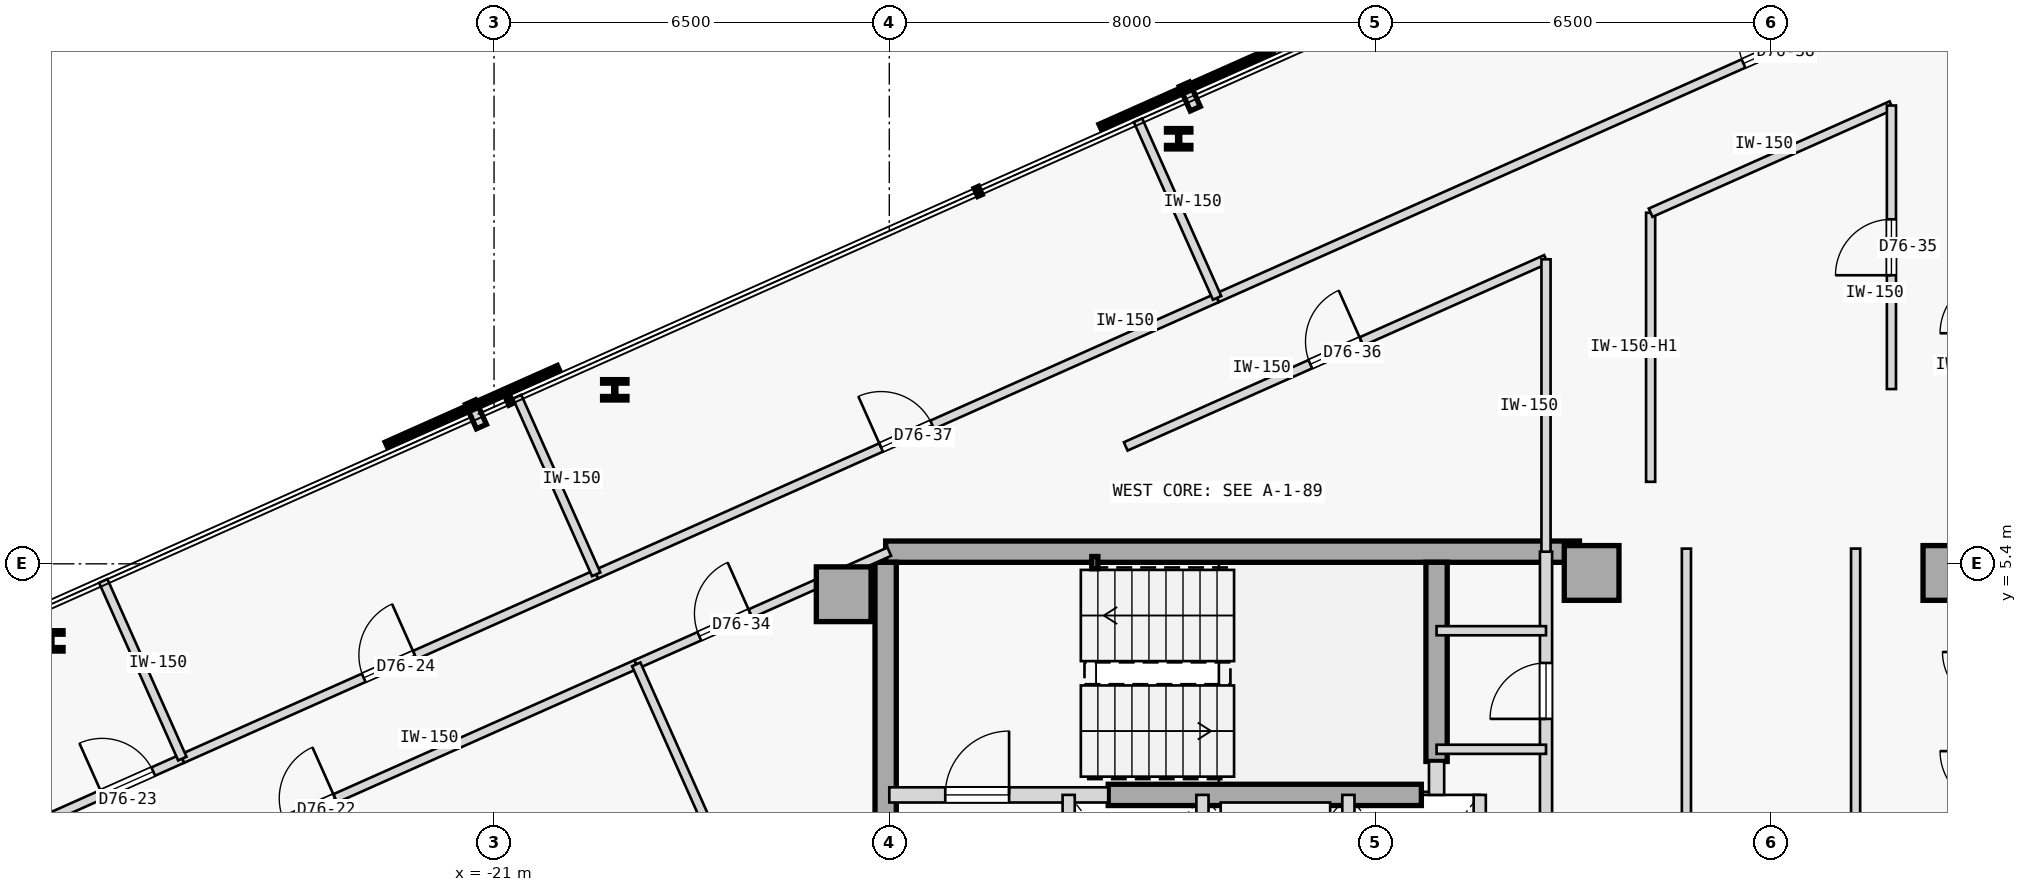
"""IFC4 building model, lengths in metres.
Left out: names, types, materials, properties, quantities, classifications, styles, units other than length and angle.
Written with IfcOpenShell. Run it as: python <this file> out.ifc"""

import sys

from ifc_helpers import new_model, si_unit, direction, frame, frame_2d, origin, origin_2d, place, context, subcontext, project, spatial, rectangle, hollow_rectangle, i_section, extrude, element, fill, save


model = new_model("IFC4")
c1 = context("Model", 3, precision=1e-05, world=origin(), true_north=direction((0.0, 1.0)))
c2 = subcontext(c1, "Body", "Model", "MODEL_VIEW")
j1 = project(units=[si_unit("LENGTHUNIT", "METRE"), si_unit("PLANEANGLEUNIT", "RADIAN")], contexts=[c1])
p1 = place(None, origin())
s1 = spatial("IfcSite", under=j1, at=p1, CompositionType="ELEMENT")
p2 = place(p1, origin())
s2 = spatial("IfcBuilding", under=s1, at=p2, CompositionType="ELEMENT")
p3 = place(p2, frame((0.0, 0.0, 285.25)))
s3 = spatial("IfcBuildingStorey", under=s2, at=p3, CompositionType="ELEMENT", Elevation=285.25)
for number, where, z_axis, x_axis in (
    (1, (-15.25, 4.9, 0.0), (0.0, 0.0, 1.0), (1.0, 0.0, 0.0)),
    (2, (-2.95, 5.25, 0.0), (0.0, 0.0, 1.0), (1.0, 0.0, 0.0)),
    (3, (2.95, 5.25, 0.0), (0.0, 0.0, 1.0), (1.0, 0.0, 0.0)),
):
    element("IfcColumn", number, at=place(p3, frame(where, z_axis=z_axis, x_axis=x_axis)), inside=s3, PredefinedType="COLUMN", context=c2, shape_type="SweptSolid", body=[
        extrude(rectangle(XDim=0.9, YDim=0.9, at=origin_2d()), origin(), (0.0, 0.0, 1.0), 3.35),
    ])
p4 = place(p3, frame((-14.56, 5.6, 0.0), z_axis=(0.0, 0.0, 1.0), x_axis=(1.0, 0.0, 0.0)))
e4 = element("IfcWall", 4, at=p4, inside=s3, PredefinedType="SHEAR", context=c2, shape_type="SweptSolid", body=[
    extrude(rectangle(XDim=11.41, YDim=0.35, at=frame_2d((5.705, 0.0))), origin(), (0.0, 0.0, 1.0), 3.125),
])
p5 = place(p3, frame((-14.56, -5.425, 0.0), z_axis=(0.0, 0.0, 1.0), x_axis=(0.0, 1.0, 0.0)))
e5 = element("IfcWall", 5, at=p5, inside=s3, PredefinedType="SHEAR", context=c2, shape_type="SweptSolid", body=[
    extrude(rectangle(XDim=10.85, YDim=0.35, at=frame_2d((5.425, 0.0))), origin(), (0.0, 0.0, 1.0), 3.125),
])
p6 = place(p3, frame((-5.5, 2.15, 0.0), z_axis=(0.0, 0.0, 1.0), x_axis=(0.0, 1.0, 0.0)))
e6 = element("IfcWall", 6, at=p6, inside=s3, PredefinedType="SHEAR", context=c2, shape_type="SweptSolid", body=[
    extrude(rectangle(XDim=3.275, YDim=0.35, at=frame_2d((1.638, 0.0))), origin(), (0.0, 0.0, 1.0), 3.125),
])
p7 = place(p3, frame((-10.9, 1.6, 0.0), z_axis=(0.0, 0.0, 1.0), x_axis=(1.0, 0.0, 0.0)))
e7 = element("IfcWall", 7, at=p7, inside=s3, PredefinedType="SHEAR", context=c2, shape_type="SweptSolid", body=[
    extrude(rectangle(XDim=5.15, YDim=0.35, at=frame_2d((2.575, 0.0))), origin(), (0.0, 0.0, 1.0), 3.125),
])
p8 = place(p3, frame((-11.12, 5.42, 0.0), z_axis=(0.0, 0.0, 1.0), x_axis=(1.0, 0.0, 0.0)))
e8 = element("IfcColumn", 8, at=p8, inside=s3, PredefinedType="COLUMN", context=c2, shape_type="SweptSolid", body=[
    extrude(hollow_rectangle(XDim=0.1, YDim=0.2, WallThickness=0.008, at=origin_2d()), origin(), (0.0, 0.0, 1.0), 3.35),
])
for number, where, z_axis, x_axis in (
    (9, (-9.741, 12.39, 0.0), (0.0, 0.0, 1.0), (1.0, 0.0, 0.0)),
    (10, (-19.015, 8.262, 0.0), (0.0, 0.0, 1.0), (1.0, 0.0, 0.0)),
    (11, (-28.288, 4.133, 0.0), (0.0, 0.0, 1.0), (1.0, 0.0, 0.0)),
):
    element("IfcColumn", number, at=place(p3, frame(where, z_axis=z_axis, x_axis=x_axis)), inside=s3, PredefinedType="COLUMN", context=c2, shape_type="SweptSolid", body=[
        extrude(i_section(OverallWidth=0.401, OverallDepth=0.335, WebThickness=0.036, FlangeThickness=0.058, FilletRadius=0.015, at=origin_2d()), origin(), (0.0, 0.0, 1.0), 3.35),
    ])
p9 = place(p3, frame((-14.5, 1.6, 0.0), z_axis=(0.0, 0.0, 1.0), x_axis=(1.0, 0.0, 0.0)))
e12 = element("IfcWall", 12, at=p9, inside=s3, PredefinedType="STANDARD", context=c2, shape_type="SweptSolid", body=[
    extrude(rectangle(XDim=3.6, YDim=0.25, at=frame_2d((1.8, 0.0))), origin(), (0.0, 0.0, 1.0), 3.125),
])
p10 = place(p9, frame((0.92, 0.0, 0.0)))
e13 = element("IfcOpeningElement", 13, at=p10, cuts=e12, PredefinedType="OPENING", context=c2, shape_type="SweptSolid", body=[
    extrude(rectangle(XDim=1.05, YDim=2.15, at=frame_2d((0.525, 1.075))), frame((0.0, 0.135, 0.0), z_axis=(0.0, -1.0, 0.0), x_axis=(1.0, 0.0, 0.0)), (0.0, 0.0, 1.0), 0.27),
])
p11 = place(p3, frame((-5.5, 1.6, 0.0), z_axis=(0.0, 0.0, 1.0), x_axis=(0.0, 1.0, 0.0)))
e14 = element("IfcWall", 14, at=p11, inside=s3, PredefinedType="STANDARD", context=c2, shape_type="SweptSolid", body=[
    extrude(rectangle(XDim=0.55, YDim=0.25, at=frame_2d((0.275, 0.0))), origin(), (0.0, 0.0, 1.0), 3.125),
])
p12 = place(p3, frame((-3.7, -1.15, 0.0), z_axis=(0.0, 0.0, 1.0), x_axis=(0.0, 1.0, 0.0)))
e15 = element("IfcWall", 15, at=p12, inside=s3, PredefinedType="STANDARD", context=c2, shape_type="SweptSolid", body=[
    extrude(rectangle(XDim=6.75, YDim=0.2, at=frame_2d((3.375, 0.0))), origin(), (0.0, 0.0, 1.0), 3.125),
])
p13 = place(p12, frame((1.1, 0.0, 0.0)))
e16 = element("IfcOpeningElement", 16, at=p13, cuts=e15, PredefinedType="OPENING", context=c2, shape_type="SweptSolid", body=[
    extrude(rectangle(XDim=0.9, YDim=2.15, at=frame_2d((0.45, 1.075))), frame((0.0, 0.11, 0.0), z_axis=(0.0, -1.0, 0.0), x_axis=(1.0, 0.0, 0.0)), (0.0, 0.0, 1.0), 0.22),
])
p14 = place(p12, frame((4.0, 0.0, 0.0)))
e17 = element("IfcOpeningElement", 17, at=p14, cuts=e15, PredefinedType="OPENING", context=c2, shape_type="SweptSolid", body=[
    extrude(rectangle(XDim=0.92, YDim=2.15, at=frame_2d((0.46, 1.075))), frame((0.0, 0.11, 0.0), z_axis=(0.0, -1.0, 0.0), x_axis=(1.0, 0.0, 0.0)), (0.0, 0.0, 1.0), 0.22),
])
p15 = place(p3, frame((-11.55, -1.15, 0.0), z_axis=(0.0, 0.0, 1.0), x_axis=(0.0, 1.0, 0.0)))
e18 = element("IfcWall", 18, at=p15, inside=s3, PredefinedType="STANDARD", context=c2, shape_type="SweptSolid", body=[
    extrude(rectangle(XDim=2.75, YDim=0.2, at=frame_2d((1.375, 0.0))), origin(), (0.0, 0.0, 1.0), 3.125),
])
p16 = place(p15, frame((0.825, 0.0, 0.0)))
e19 = element("IfcOpeningElement", 19, at=p16, cuts=e18, PredefinedType="OPENING", context=c2, shape_type="SweptSolid", body=[
    extrude(rectangle(XDim=1.1, YDim=2.15, at=frame_2d((0.55, 1.075))), frame((0.0, 0.11, 0.0), z_axis=(0.0, -1.0, 0.0), x_axis=(1.0, 0.0, 0.0)), (0.0, 0.0, 1.0), 0.22),
])
for number, where, z_axis, x_axis in (
    (20, (-9.35, -1.15, 0.0), (0.0, 0.0, 1.0), (0.0, 1.0, 0.0)),
    (21, (-6.95, -1.15, 0.0), (0.0, 0.0, 1.0), (0.0, 1.0, 0.0)),
    (22, (-4.79, -1.15, 0.0), (0.0, 0.0, 1.0), (0.0, 1.0, 0.0)),
):
    element("IfcWall", number, at=place(p3, frame(where, z_axis=z_axis, x_axis=x_axis)), inside=s3, PredefinedType="STANDARD", context=c2, shape_type="SweptSolid", body=[
        extrude(rectangle(XDim=2.75, YDim=0.2, at=frame_2d((1.375, 0.0))), origin(), (0.0, 0.0, 1.0), 3.125),
    ])
for number, where, z_axis, x_axis in (
    (23, (-5.5, 4.3, 0.0), (0.0, 0.0, 1.0), (1.0, 0.0, 0.0)),
    (24, (-5.5, 2.35, 0.0), (0.0, 0.0, 1.0), (1.0, 0.0, 0.0)),
):
    element("IfcWall", number, at=place(p3, frame(where, z_axis=z_axis, x_axis=x_axis)), inside=s3, PredefinedType="PARTITIONING", context=c2, shape_type="SweptSolid", body=[
        extrude(rectangle(XDim=1.8, YDim=0.15, at=frame_2d((0.9, 0.0))), origin(), (0.0, 0.0, 1.0), 3.125),
    ])
p17 = place(p3, frame((-1.391, -5.65, 0.0), z_axis=(0.0, 0.0, 1.0), x_axis=(-2.1605738e-05, 0.999999999767, 0.0)))
e25 = element("IfcWall", 25, at=p17, inside=s3, PredefinedType="PARTITIONING", context=c2, shape_type="SweptSolid", body=[
    extrude(rectangle(XDim=11.3, YDim=0.15, at=frame_2d((5.65, 0.0))), origin(), (0.0, 0.0, 1.0), 3.125),
])
p18 = place(p3, frame((1.391, -5.65, 0.0), z_axis=(0.0, 0.0, 1.0), x_axis=(4.3206809e-05, 0.999999999067, 0.0)))
e26 = element("IfcWall", 26, at=p18, inside=s3, PredefinedType="PARTITIONING", context=c2, shape_type="SweptSolid", body=[
    extrude(rectangle(XDim=11.301, YDim=0.15, at=frame_2d((5.65, 0.0))), origin(), (0.0, 0.0, 1.0), 3.125),
])
p19 = place(p18, frame((5.176, 0.0, 0.0)))
e27 = element("IfcOpeningElement", 27, at=p19, cuts=e26, PredefinedType="OPENING", context=c2, shape_type="SweptSolid", body=[
    extrude(rectangle(XDim=0.95, YDim=2.15, at=frame_2d((0.475, 1.075))), frame((0.0, 0.085, 0.0), z_axis=(0.0, -1.0, 0.0), x_axis=(1.0, 0.0, 0.0)), (0.0, 0.0, 1.0), 0.17),
])
p20 = place(p3, frame((-29.404, -1.036, 0.0), z_axis=(0.0, 0.0, 1.0), x_axis=(0.913544247064, 0.406739362069, 0.0)))
e28 = element("IfcWall", 28, at=p20, inside=s3, PredefinedType="PARTITIONING", context=c2, shape_type="SweptSolid", body=[
    extrude(rectangle(XDim=11.76, YDim=0.15, at=frame_2d((5.88, 0.0))), origin(), (0.0, 0.0, 1.0), 3.125),
])
p21 = place(p20, frame((5.42, 0.0, 0.0)))
e29 = element("IfcOpeningElement", 29, at=p21, cuts=e28, PredefinedType="OPENING", context=c2, shape_type="SweptSolid", body=[
    extrude(rectangle(XDim=0.92, YDim=2.15, at=frame_2d((0.46, 1.075))), frame((0.0, 0.085, 0.0), z_axis=(0.0, -1.0, 0.0), x_axis=(1.0, 0.0, 0.0)), (0.0, 0.0, 1.0), 0.17),
])
p22 = place(p3, frame((-30.063, 0.444, 0.0), z_axis=(0.0, 0.0, 1.0), x_axis=(0.91352868173, 0.406774320302, 0.0)))
e30 = element("IfcWall", 30, at=p22, inside=s3, PredefinedType="PARTITIONING", context=c2, shape_type="SweptSolid", body=[
    extrude(rectangle(XDim=4.31, YDim=0.15, at=frame_2d((2.155, 0.0))), origin(), (0.0, 0.0, 1.0), 3.125),
])
p23 = place(p22, frame((2.866, 0.0, 0.0)))
e31 = element("IfcOpeningElement", 31, at=p23, cuts=e30, PredefinedType="OPENING", context=c2, shape_type="SweptSolid", body=[
    extrude(rectangle(XDim=0.92, YDim=2.15, at=frame_2d((0.46, 1.075))), frame((0.0, 0.085, 0.0), z_axis=(0.0, -1.0, 0.0), x_axis=(1.0, 0.0, 0.0)), (0.0, 0.0, 1.0), 0.17),
])
p24 = place(p3, frame((-26.126, 2.197, 0.0), z_axis=(0.0, 0.0, 1.0), x_axis=(0.913553251328, 0.40671913772, 0.0)))
e32 = element("IfcWall", 32, at=p24, inside=s3, PredefinedType="PARTITIONING", context=c2, shape_type="SweptSolid", body=[
    extrude(rectangle(XDim=7.45, YDim=0.15, at=frame_2d((3.725, 0.0))), origin(), (0.0, 0.0, 1.0), 3.125),
])
p25 = place(p24, frame((3.265, 0.0, 0.0)))
e33 = element("IfcOpeningElement", 33, at=p25, cuts=e32, PredefinedType="OPENING", context=c2, shape_type="SweptSolid", body=[
    extrude(rectangle(XDim=0.92, YDim=2.15, at=frame_2d((0.46, 1.075))), frame((0.0, 0.085, 0.0), z_axis=(0.0, -1.0, 0.0), x_axis=(1.0, 0.0, 0.0)), (0.0, 0.0, 1.0), 0.17),
])
p26 = place(p3, frame((-18.661, 3.747, 0.0), z_axis=(0.0, 0.0, 1.0), x_axis=(0.913535055583, 0.40676000568, 0.0)))
e34 = element("IfcWall", 34, at=p26, inside=s3, PredefinedType="PARTITIONING", context=c2, shape_type="SweptSolid", body=[
    extrude(rectangle(XDim=4.555, YDim=0.15, at=frame_2d((2.277, 0.0))), origin(), (0.0, 0.0, 1.0), 3.125),
])
p27 = place(p26, frame((1.134, 0.0, 0.0)))
e35 = element("IfcOpeningElement", 35, at=p27, cuts=e34, PredefinedType="OPENING", context=c2, shape_type="SweptSolid", body=[
    extrude(rectangle(XDim=0.92, YDim=2.15, at=frame_2d((0.46, 1.075))), frame((0.0, 0.085, 0.0), z_axis=(0.0, -1.0, 0.0), x_axis=(1.0, 0.0, 0.0)), (0.0, 0.0, 1.0), 0.17),
])
p28 = place(p3, frame((-1.98, 6.749, 0.0), z_axis=(0.0, 0.0, 1.0), x_axis=(0.0, 1.0, 0.0)))
e36 = element("IfcWall", 36, at=p28, inside=s3, PredefinedType="PARTITIONING", context=c2, shape_type="SweptSolid", body=[
    extrude(rectangle(XDim=4.426, YDim=0.15, at=frame_2d((2.213, 0.0))), origin(), (0.0, 0.0, 1.0), 2.675),
])
p29 = place(p3, frame((-1.98, 11.174, 0.0), z_axis=(0.0, 0.0, 1.0), x_axis=(0.913546598225, 0.406734081276, 0.0)))
e37 = element("IfcWall", 37, at=p29, inside=s3, PredefinedType="PARTITIONING", context=c2, shape_type="SweptSolid", body=[
    extrude(rectangle(XDim=4.335, YDim=0.15, at=frame_2d((2.167, 0.0))), origin(), (0.0, 0.0, 1.0), 3.125),
])
p30 = place(p3, frame((1.98, 8.274, 0.0), z_axis=(0.0, 0.0, 1.0), x_axis=(5.2356021e-05, 0.999999998629, 0.0)))
e38 = element("IfcWall", 38, at=p30, inside=s3, PredefinedType="PARTITIONING", context=c2, shape_type="SweptSolid", body=[
    extrude(rectangle(XDim=4.663, YDim=0.15, at=frame_2d((2.332, 0.0))), origin(), (0.0, 0.0, 1.0), 3.125),
])
p31 = place(p30, frame((1.872, 0.0, 0.0)))
e39 = element("IfcOpeningElement", 39, at=p31, cuts=e38, PredefinedType="OPENING", context=c2, shape_type="SweptSolid", body=[
    extrude(rectangle(XDim=0.92, YDim=2.15, at=frame_2d((0.46, 1.075))), frame((0.0, 0.085, 0.0), z_axis=(0.0, -1.0, 0.0), x_axis=(1.0, 0.0, 0.0)), (0.0, 0.0, 1.0), 0.17),
])
p32 = place(p3, frame((-10.612, 7.331, 0.0), z_axis=(0.0, 0.0, 1.0), x_axis=(0.913543890665, 0.406740162546, 0.0)))
e40 = element("IfcWall", 40, at=p32, inside=s3, PredefinedType="PARTITIONING", context=c2, shape_type="SweptSolid", body=[
    extrude(rectangle(XDim=7.566, YDim=0.15, at=frame_2d((3.783, 0.0))), origin(), (0.0, 0.0, 1.0), 3.125),
])
p33 = place(p32, frame((3.323, 0.0, 0.0)))
e41 = element("IfcOpeningElement", 41, at=p33, cuts=e40, PredefinedType="OPENING", context=c2, shape_type="SweptSolid", body=[
    extrude(rectangle(XDim=0.92, YDim=2.15, at=frame_2d((0.46, 1.075))), frame((0.0, 0.085, 0.0), z_axis=(0.0, -1.0, 0.0), x_axis=(1.0, 0.0, 0.0)), (0.0, 0.0, 1.0), 0.17),
])
p34 = place(p3, frame((-3.7, 5.6, 0.0), z_axis=(0.0, 0.0, 1.0), x_axis=(5.077173e-05, 0.999999998711, 0.0)))
e42 = element("IfcWall", 42, at=p34, inside=s3, PredefinedType="PARTITIONING", context=c2, shape_type="SweptSolid", body=[
    extrude(rectangle(XDim=4.809, YDim=0.15, at=frame_2d((2.404, 0.0))), origin(), (0.0, 0.0, 1.0), 3.125),
])
p35 = place(p3, frame((-19.32, 5.227, 0.0), z_axis=(0.0, 0.0, 1.0), x_axis=(0.913543828741, 0.406740301628, 0.0)))
e43 = element("IfcWall", 43, at=p35, inside=s3, PredefinedType="PARTITIONING", context=c2, shape_type="SweptSolid", body=[
    extrude(rectangle(XDim=11.177, YDim=0.15, at=frame_2d((5.588, 0.0))), origin(), (0.0, 0.0, 1.0), 3.125),
])
p36 = place(p35, frame((5.128, 0.0, 0.0)))
e44 = element("IfcOpeningElement", 44, at=p36, cuts=e43, PredefinedType="OPENING", context=c2, shape_type="SweptSolid", body=[
    extrude(rectangle(XDim=0.92, YDim=2.15, at=frame_2d((0.46, 1.075))), frame((0.0, 0.085, 0.0), z_axis=(0.0, -1.0, 0.0), x_axis=(1.0, 0.0, 0.0)), (0.0, 0.0, 1.0), 0.17),
])
p37 = place(p3, frame((-9.109, 9.773, 0.0), z_axis=(0.0, 0.0, 1.0), x_axis=(0.913545361298, 0.406736859469, 0.0)))
e45 = element("IfcWall", 45, at=p37, inside=s3, PredefinedType="PARTITIONING", context=c2, shape_type="SweptSolid", body=[
    extrude(rectangle(XDim=19.871, YDim=0.15, at=frame_2d((9.936, 0.0))), origin(), (0.0, 0.0, 1.0), 3.125),
])
p38 = place(p37, frame((9.476, 0.0, 0.0)))
e46 = element("IfcOpeningElement", 46, at=p38, cuts=e45, PredefinedType="OPENING", context=c2, shape_type="SweptSolid", body=[
    extrude(rectangle(XDim=0.92, YDim=2.15, at=frame_2d((0.46, 1.075))), frame((0.0, 0.085, 0.0), z_axis=(0.0, -1.0, 0.0), x_axis=(1.0, 0.0, 0.0)), (0.0, 0.0, 1.0), 0.17),
])
p39 = place(p3, frame((-15.998, -2.235, 0.0), z_axis=(0.0, 0.0, 1.0), x_axis=(-0.406736853191, 0.913545364093, 0.0)))
e47 = element("IfcWall", 47, at=p39, inside=s3, PredefinedType="PARTITIONING", context=c2, shape_type="SweptSolid", body=[
    extrude(rectangle(XDim=6.548, YDim=0.15, at=frame_2d((3.274, 0.0))), origin(), (0.0, 0.0, 1.0), 3.125),
])
for number, where, z_axis, x_axis in (
    (48, (-26.126, 2.197, 0.0), (0.0, 0.0, 1.0), (-0.407, 0.914, 0.0)),
    (49, (-19.32, 5.227, 0.0), (0.0, 0.0, 1.0), (-0.407, 0.914, 0.0)),
):
    element("IfcWall", number, at=place(p3, frame(where, z_axis=z_axis, x_axis=x_axis)), inside=s3, PredefinedType="PARTITIONING", context=c2, shape_type="SweptSolid", body=[
        extrude(rectangle(XDim=3.198, YDim=0.15, at=frame_2d((1.599, 0.0))), origin(), (0.0, 0.0, 1.0), 3.125),
    ])
p40 = place(p3, frame((-9.109, 9.773, 0.0), z_axis=(0.0, 0.0, 1.0), x_axis=(-0.406698002142, 0.913562660716, 0.0)))
e50 = element("IfcWall", 50, at=p40, inside=s3, PredefinedType="PARTITIONING", context=c2, shape_type="SweptSolid", body=[
    extrude(rectangle(XDim=3.198, YDim=0.15, at=frame_2d((1.599, 0.0))), origin(), (0.0, 0.0, 1.0), 3.125),
])
p41 = place(p10, origin())
e51 = element("IfcDoor", 51, at=p41, inside=s3, OperationType="SINGLE_SWING_RIGHT", PredefinedType="DOOR", context=c2, shape_type="SweptSolid", body=[
    extrude(rectangle(XDim=1.05, YDim=2.15, at=frame_2d((0.525, 1.075))), frame((0.0, 0.025, 0.0), z_axis=(0.0, -1.0, 0.0), x_axis=(1.0, 0.0, 0.0)), (0.0, 0.0, 1.0), 0.05),
])
fill(e13, e51)
p42 = place(p14, origin())
e52 = element("IfcDoor", 52, at=p42, inside=s3, OperationType="SINGLE_SWING_LEFT", PredefinedType="DOOR", context=c2, shape_type="SweptSolid", body=[
    extrude(rectangle(XDim=0.92, YDim=2.15, at=frame_2d((0.46, 1.075))), frame((0.0, 0.025, 0.0), z_axis=(0.0, -1.0, 0.0), x_axis=(1.0, 0.0, 0.0)), (0.0, 0.0, 1.0), 0.05),
])
fill(e17, e52)
p43 = place(p21, origin())
e53 = element("IfcDoor", 53, at=p43, inside=s3, OperationType="SINGLE_SWING_RIGHT", PredefinedType="DOOR", context=c2, shape_type="SweptSolid", body=[
    extrude(rectangle(XDim=0.92, YDim=2.15, at=frame_2d((0.46, 1.075))), frame((0.0, 0.025, 0.0), z_axis=(0.0, -1.0, 0.0), x_axis=(1.0, 0.0, 0.0)), (0.0, 0.0, 1.0), 0.05),
])
fill(e29, e53)
p44 = place(p23, origin())
e54 = element("IfcDoor", 54, at=p44, inside=s3, OperationType="SINGLE_SWING_LEFT", PredefinedType="DOOR", context=c2, shape_type="SweptSolid", body=[
    extrude(rectangle(XDim=0.92, YDim=2.15, at=frame_2d((0.46, 1.075))), frame((0.0, 0.025, 0.0), z_axis=(0.0, -1.0, 0.0), x_axis=(1.0, 0.0, 0.0)), (0.0, 0.0, 1.0), 0.05),
])
fill(e31, e54)
p45 = place(p25, origin())
e55 = element("IfcDoor", 55, at=p45, inside=s3, OperationType="SINGLE_SWING_RIGHT", PredefinedType="DOOR", context=c2, shape_type="SweptSolid", body=[
    extrude(rectangle(XDim=0.92, YDim=2.15, at=frame_2d((0.46, 1.075))), frame((0.0, 0.025, 0.0), z_axis=(0.0, -1.0, 0.0), x_axis=(1.0, 0.0, 0.0)), (0.0, 0.0, 1.0), 0.05),
])
fill(e33, e55)
p46 = place(p27, origin())
e56 = element("IfcDoor", 56, at=p46, inside=s3, OperationType="SINGLE_SWING_RIGHT", PredefinedType="DOOR", context=c2, shape_type="SweptSolid", body=[
    extrude(rectangle(XDim=0.92, YDim=2.15, at=frame_2d((0.46, 1.075))), frame((0.0, 0.025, 0.0), z_axis=(0.0, -1.0, 0.0), x_axis=(1.0, 0.0, 0.0)), (0.0, 0.0, 1.0), 0.05),
])
fill(e35, e56)
p47 = place(p31, origin())
e57 = element("IfcDoor", 57, at=p47, inside=s3, OperationType="SINGLE_SWING_LEFT", PredefinedType="DOOR", context=c2, shape_type="SweptSolid", body=[
    extrude(rectangle(XDim=0.92, YDim=2.15, at=frame_2d((0.46, 1.075))), frame((0.0, 0.025, 0.0), z_axis=(0.0, -1.0, 0.0), x_axis=(1.0, 0.0, 0.0)), (0.0, 0.0, 1.0), 0.05),
])
fill(e39, e57)
p48 = place(p33, origin())
e58 = element("IfcDoor", 58, at=p48, inside=s3, OperationType="SINGLE_SWING_RIGHT", PredefinedType="DOOR", context=c2, shape_type="SweptSolid", body=[
    extrude(rectangle(XDim=0.92, YDim=2.15, at=frame_2d((0.46, 1.075))), frame((0.0, 0.025, 0.0), z_axis=(0.0, -1.0, 0.0), x_axis=(1.0, 0.0, 0.0)), (0.0, 0.0, 1.0), 0.05),
])
fill(e41, e58)
p49 = place(p36, origin())
e59 = element("IfcDoor", 59, at=p49, inside=s3, OperationType="SINGLE_SWING_LEFT", PredefinedType="DOOR", context=c2, shape_type="SweptSolid", body=[
    extrude(rectangle(XDim=0.92, YDim=2.15, at=frame_2d((0.46, 1.075))), frame((0.0, 0.025, 0.0), z_axis=(0.0, -1.0, 0.0), x_axis=(1.0, 0.0, 0.0)), (0.0, 0.0, 1.0), 0.05),
])
fill(e44, e59)
p50 = place(p38, origin())
e60 = element("IfcDoor", 60, at=p50, inside=s3, OperationType="SINGLE_SWING_RIGHT", PredefinedType="DOOR", context=c2, shape_type="SweptSolid", body=[
    extrude(rectangle(XDim=0.92, YDim=2.15, at=frame_2d((0.46, 1.075))), frame((0.0, 0.025, 0.0), z_axis=(0.0, -1.0, 0.0), x_axis=(1.0, 0.0, 0.0)), (0.0, 0.0, 1.0), 0.05),
])
fill(e46, e60)
save(model, sys.argv[1])
